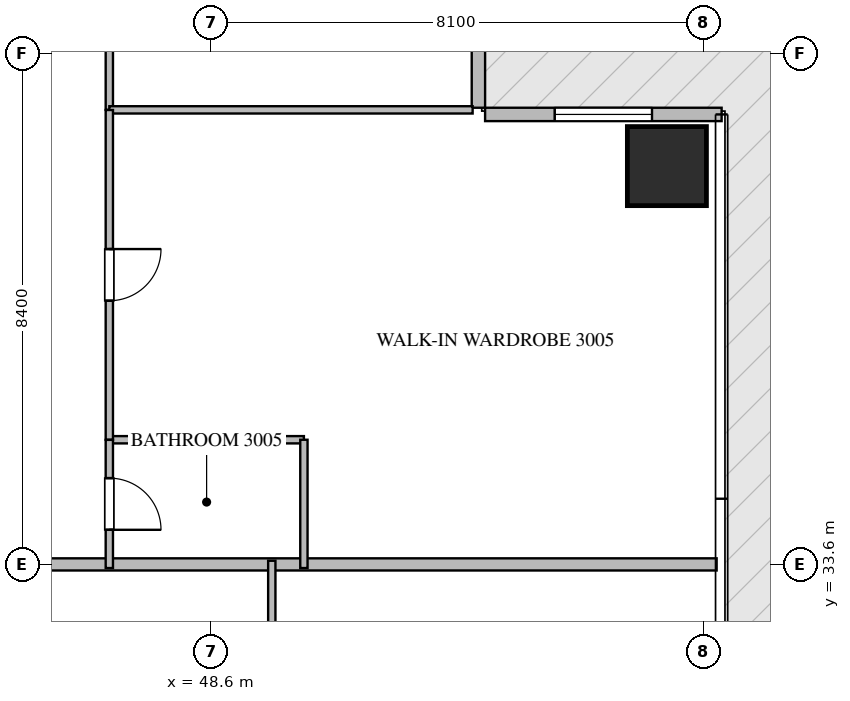
"""IFC4 building model, lengths in metres.
Left out: names, types, materials, properties, quantities, classifications, styles, units other than length and angle.
Written with IfcOpenShell. Run it as: python <this file> out.ifc"""

import sys

from ifc_helpers import new_model, si_unit, direction, frame, frame_2d, origin, origin_2d, place, context, subcontext, project, spatial, rectangle, extrude, source, transform, mapped, element, fill, save


model = new_model("IFC4")
c1 = context("Model", 3, precision=1e-05, world=origin(), true_north=direction((0.0, 1.0)))
c2 = subcontext(c1, "Body", "Model", "MODEL_VIEW")
j1 = project(units=[si_unit("LENGTHUNIT", "METRE"), si_unit("PLANEANGLEUNIT", "RADIAN")], contexts=[c1])
p1 = place(None, origin())
s1 = spatial("IfcSite", under=j1, at=p1, CompositionType="ELEMENT")
p2 = place(p1, origin())
s2 = spatial("IfcBuilding", under=s1, at=p2, CompositionType="ELEMENT")
p3 = place(p2, frame((0.0, 0.0, 123.9)))
s3 = spatial("IfcBuildingStorey", under=s2, at=p3, CompositionType="ELEMENT", Elevation=123.9)
m1 = source(origin(), c2, "Body", "SweptSolid", [
    extrude(rectangle(XDim=1.3, YDim=1.3, at=origin_2d()), origin(), (0.0, 0.0, 1.0), 3.75),
])
p4 = place(p3, frame((56.1, 40.15, -0.26), z_axis=(0.0, 0.0, 1.0), x_axis=(1.0, 0.0, 0.0)))
e1 = element("IfcColumn", 1, at=p4, inside=s3, PredefinedType="COLUMN", context=c2, shape_type="MappedRepresentation", body=[
    mapped(m1, transform((0.0, 0.0, 0.0), scale=1.0)),
])
p5 = place(p3, frame((57.0, 41.0, 0.0), z_axis=(0.0, 0.0, 1.0), x_axis=(-1.0, 0.0, 0.0)))
e2 = element("IfcWall", 2, at=p5, inside=s3, PredefinedType="ELEMENTEDWALL", context=c2, shape_type="SweptSolid", body=[
    extrude(rectangle(XDim=3.89, YDim=0.22, at=frame_2d((1.945, 0.0))), origin(), (0.0, 0.0, 1.0), 3.475),
])
p6 = place(p5, frame((1.145, 0.0, 0.65)))
e3 = element("IfcOpeningElement", 3, at=p6, cuts=e2, PredefinedType="OPENING", context=c2, shape_type="SweptSolid", body=[
    extrude(rectangle(XDim=1.6, YDim=2.1, at=frame_2d((0.8, 1.05))), frame((0.0, 0.12, 0.0), z_axis=(0.0, -1.0, 0.0), x_axis=(1.0, 0.0, 0.0)), (0.0, 0.0, 1.0), 0.24),
])
p7 = place(p3, frame((53.0, 41.11, 0.0), z_axis=(0.0, 0.0, 1.0), x_axis=(0.0, 1.0, 0.0)))
e4 = element("IfcWall", 4, at=p7, inside=s3, PredefinedType="ELEMENTEDWALL", context=c2, shape_type="SweptSolid", body=[
    extrude(rectangle(XDim=3.78, YDim=0.22, at=frame_2d((1.89, 0.0))), origin(), (0.0, 0.0, 1.0), 3.475),
])
p8 = place(p7, frame((1.09, 0.0, 0.65)))
e5 = element("IfcOpeningElement", 5, at=p8, cuts=e4, PredefinedType="OPENING", context=c2, shape_type="SweptSolid", body=[
    extrude(rectangle(XDim=1.6, YDim=2.1, at=frame_2d((0.8, 1.05))), frame((0.0, 0.12, 0.0), z_axis=(0.0, -1.0, 0.0), x_axis=(1.0, 0.0, 0.0)), (0.0, 0.0, 1.0), 0.24),
])
p9 = place(p3, frame((43.85, 33.6, 0.0), z_axis=(0.0, 0.0, 1.0), x_axis=(1.0, 0.0, 0.0)))
e6 = element("IfcWall", 6, at=p9, inside=s3, PredefinedType="PARTITIONING", context=c2, shape_type="SweptSolid", body=[
    extrude(rectangle(XDim=13.068, YDim=0.2, at=frame_2d((6.534, 0.0))), origin(), (0.0, 0.0, 1.0), 3.49),
])
p10 = place(p3, frame((46.93, 48.905, 0.0), z_axis=(0.0, 0.0, 1.0), x_axis=(0.0, -1.0, 0.0)))
e7 = element("IfcWall", 7, at=p10, inside=s3, PredefinedType="PARTITIONING", context=c2, shape_type="SweptSolid", body=[
    extrude(rectangle(XDim=7.83, YDim=0.12, at=frame_2d((3.915, 0.0))), origin(), (0.0, 0.0, 1.0), 3.49),
])
p11 = place(p10, frame((3.811, 0.0, 0.0)))
e8 = element("IfcOpeningElement", 8, at=p11, cuts=e7, PredefinedType="OPENING", context=c2, shape_type="SweptSolid", body=[
    extrude(rectangle(XDim=0.9, YDim=2.1, at=frame_2d((0.45, 1.05))), frame((0.0, 0.07, 0.0), z_axis=(0.0, -1.0, 0.0), x_axis=(1.0, 0.0, 0.0)), (0.0, 0.0, 1.0), 0.14),
])
p12 = place(p3, frame((46.93, 41.075, 0.0), z_axis=(0.0, 0.0, 1.0), x_axis=(1.0, 0.0, 0.0)))
e9 = element("IfcWall", 9, at=p12, inside=s3, PredefinedType="PARTITIONING", context=c2, shape_type="SweptSolid", body=[
    extrude(rectangle(XDim=5.975, YDim=0.12, at=frame_2d((2.988, 0.0))), origin(), (0.0, 0.0, 1.0), 3.49),
])
p13 = place(p3, frame((46.93, 35.65, 0.0), z_axis=(0.0, 0.0, 1.0), x_axis=(1.0, 0.0, 0.0)))
e10 = element("IfcWall", 10, at=p13, inside=s3, PredefinedType="PARTITIONING", context=c2, shape_type="SweptSolid", body=[
    extrude(rectangle(XDim=3.2, YDim=0.12, at=frame_2d((1.6, 0.0))), origin(), (0.0, 0.0, 1.0), 3.49),
])
p14 = place(p3, frame((50.13, 35.65, 0.0), z_axis=(0.0, 0.0, 1.0), x_axis=(0.0, -1.0, 0.0)))
e11 = element("IfcWall", 11, at=p14, inside=s3, PredefinedType="PARTITIONING", context=c2, shape_type="SweptSolid", body=[
    extrude(rectangle(XDim=2.11, YDim=0.12, at=frame_2d((1.055, 0.0))), origin(), (0.0, 0.0, 1.0), 3.49),
])
p15 = place(p3, frame((46.93, 41.073, 0.0), z_axis=(0.0, 0.0, 1.0), x_axis=(0.0, -1.0, 0.0)))
e12 = element("IfcWall", 12, at=p15, inside=s3, PredefinedType="PARTITIONING", context=c2, shape_type="SweptSolid", body=[
    extrude(rectangle(XDim=5.423, YDim=0.12, at=frame_2d((2.711, 0.0))), origin(), (0.0, 0.0, 1.0), 3.49),
])
p16 = place(p15, frame((2.287, 0.0, 0.0)))
e13 = element("IfcOpeningElement", 13, at=p16, cuts=e12, PredefinedType="OPENING", context=c2, shape_type="SweptSolid", body=[
    extrude(rectangle(XDim=0.85, YDim=2.1, at=frame_2d((0.425, 1.05))), frame((0.0, 0.07, 0.0), z_axis=(0.0, -1.0, 0.0), x_axis=(1.0, 0.0, 0.0)), (0.0, 0.0, 1.0), 0.14),
])
p17 = place(p3, frame((46.93, 35.648, 0.0), z_axis=(0.0, 0.0, 1.0), x_axis=(0.0, -1.0, 0.0)))
e14 = element("IfcWall", 14, at=p17, inside=s3, PredefinedType="PARTITIONING", context=c2, shape_type="SweptSolid", body=[
    extrude(rectangle(XDim=2.108, YDim=0.12, at=frame_2d((1.054, 0.0))), origin(), (0.0, 0.0, 1.0), 3.49),
])
p18 = place(p17, frame((0.629, 0.0, 0.0)))
e15 = element("IfcOpeningElement", 15, at=p18, cuts=e14, PredefinedType="OPENING", context=c2, shape_type="SweptSolid", body=[
    extrude(rectangle(XDim=0.85, YDim=2.1, at=frame_2d((0.425, 1.05))), frame((0.0, 0.07, 0.0), z_axis=(0.0, -1.0, 0.0), x_axis=(1.0, 0.0, 0.0)), (0.0, 0.0, 1.0), 0.14),
])
p19 = place(p3, frame((49.602, 27.8, 0.0), z_axis=(0.0, 0.0, 1.0), x_axis=(0.0, 1.0, 0.0)))
e16 = element("IfcWall", 16, at=p19, inside=s3, PredefinedType="PARTITIONING", context=c2, shape_type="SweptSolid", body=[
    extrude(rectangle(XDim=5.86, YDim=0.12, at=frame_2d((2.93, 0.0))), origin(), (0.0, 0.0, 1.0), 3.49),
])
m2 = source(origin(), c2, "Body", "SweptSolid", [
    extrude(rectangle(XDim=1.6, YDim=2.1, at=frame_2d((0.8, 1.05))), frame((0.0, 0.03, 0.0), z_axis=(0.0, -1.0, 0.0), x_axis=(1.0, 0.0, 0.0)), (0.0, 0.0, 1.0), 0.06),
])
p20 = place(p6, origin())
e17 = element("IfcWindow", 17, at=p20, inside=s3, PartitioningType="SINGLE_PANEL", PredefinedType="WINDOW", context=c2, shape_type="MappedRepresentation", body=[
    mapped(m2, transform((0.0, 0.0, 0.0), scale=1.0)),
])
fill(e3, e17)
m3 = source(origin(), c2, "Body", "SweptSolid", [
    extrude(rectangle(XDim=0.85, YDim=2.1, at=frame_2d((0.425, 1.05))), frame((0.0, 0.025, 0.0), z_axis=(0.0, -1.0, 0.0), x_axis=(1.0, 0.0, 0.0)), (0.0, 0.0, 1.0), 0.05),
])
p21 = place(p16, origin())
e18 = element("IfcDoor", 18, at=p21, inside=s3, OperationType="SINGLE_SWING_LEFT", PredefinedType="DOOR", context=c2, shape_type="MappedRepresentation", body=[
    mapped(m3, transform((0.0, 0.0, 0.0), scale=1.0)),
])
fill(e13, e18)
p22 = place(p18, origin())
e19 = element("IfcDoor", 19, at=p22, inside=s3, OperationType="SINGLE_SWING_RIGHT", PredefinedType="DOOR", context=c2, shape_type="MappedRepresentation", body=[
    mapped(m3, transform((0.0, 0.0, 0.0), scale=1.0)),
])
fill(e15, e19)
save(model, sys.argv[1])
